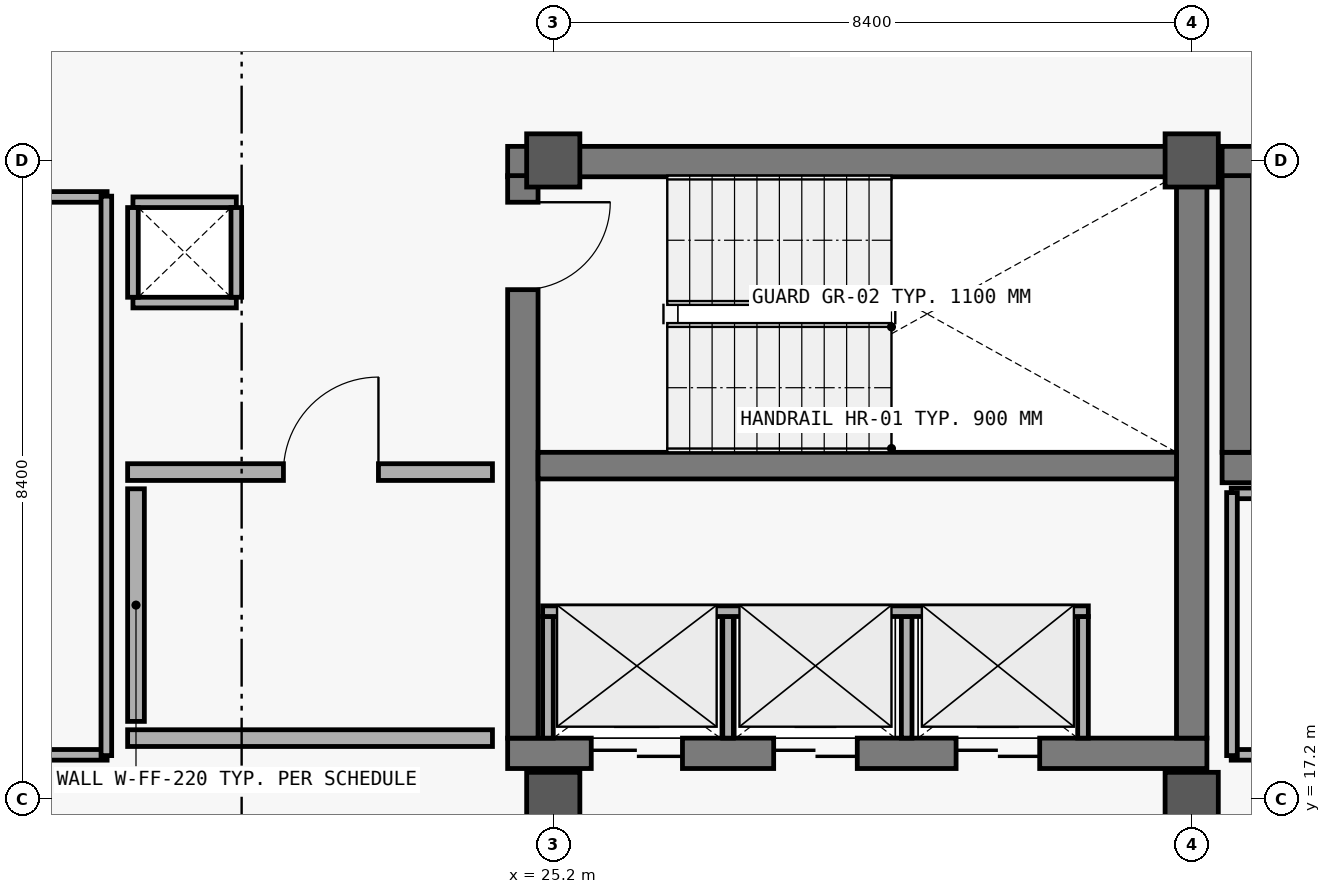
"""IFC4 building model, lengths in metres.
Left out: names, types, materials, properties, quantities, classifications, styles, units other than length and angle.
Written with IfcOpenShell. Run it as: python <this file> out.ifc"""

import sys

from ifc_helpers import new_model, si_unit, direction, frame, frame_2d, origin, origin_2d, place, context, subcontext, project, spatial, rectangle, extrude, element, fill, save


model = new_model("IFC4")
c1 = context("Model", 3, precision=1e-05, world=origin(), true_north=direction((0.0, 1.0)))
c2 = subcontext(c1, "Body", "Model", "MODEL_VIEW")
j1 = project(units=[si_unit("LENGTHUNIT", "METRE"), si_unit("PLANEANGLEUNIT", "RADIAN")], contexts=[c1])
p1 = place(None, origin())
s1 = spatial("IfcSite", under=j1, at=p1, CompositionType="ELEMENT")
p2 = place(p1, origin())
s2 = spatial("IfcBuilding", under=s1, at=p2, CompositionType="ELEMENT")
p3 = place(p2, frame((0.0, 0.0, 26.4)))
s3 = spatial("IfcBuildingStorey", under=s2, at=p3, CompositionType="ELEMENT", Elevation=26.4)
for number, where, z_axis, x_axis in (
    (1, (25.2, 17.2, 0.0), (0.0, 0.0, 1.0), (1.0, 0.0, 0.0)),
    (2, (25.2, 25.6, 0.0), (0.0, 0.0, 1.0), (1.0, 0.0, 0.0)),
    (3, (33.6, 17.2, 0.0), (0.0, 0.0, 1.0), (1.0, 0.0, 0.0)),
    (4, (33.6, 25.6, 0.0), (0.0, 0.0, 1.0), (1.0, 0.0, 0.0)),
):
    element("IfcColumn", number, at=place(p3, frame(where, z_axis=z_axis, x_axis=x_axis)), inside=s3, PredefinedType="COLUMN", context=c2, shape_type="SweptSolid", body=[
        extrude(rectangle(XDim=0.7, YDim=0.7, at=origin_2d()), origin(), (0.0, 0.0, 1.0), 3.6),
    ])
p4 = place(p3, frame((24.6, 17.8, 0.0), z_axis=(0.0, 0.0, 1.0), x_axis=(1.0, 0.0, 0.0)))
e5 = element("IfcWall", 5, at=p4, inside=s3, PredefinedType="SHEAR", context=c2, shape_type="SweptSolid", body=[
    extrude(rectangle(XDim=9.2, YDim=0.4, at=frame_2d((4.6, 0.0))), origin(), (0.0, 0.0, 1.0), 3.32),
])
p5 = place(p4, frame((1.1, 0.0, 0.0)))
e6 = element("IfcOpeningElement", 6, at=p5, cuts=e5, PredefinedType="OPENING", context=c2, shape_type="SweptSolid", body=[
    extrude(rectangle(XDim=1.2, YDim=2.2, at=frame_2d((0.6, 1.1))), frame((0.0, 0.21, 0.0), z_axis=(0.0, -1.0, 0.0), x_axis=(1.0, 0.0, 0.0)), (0.0, 0.0, 1.0), 0.42),
])
p6 = place(p4, frame((3.5, 0.0, 0.0)))
e7 = element("IfcOpeningElement", 7, at=p6, cuts=e5, PredefinedType="OPENING", context=c2, shape_type="SweptSolid", body=[
    extrude(rectangle(XDim=1.1, YDim=2.2, at=frame_2d((0.55, 1.1))), frame((0.0, 0.21, 0.0), z_axis=(0.0, -1.0, 0.0), x_axis=(1.0, 0.0, 0.0)), (0.0, 0.0, 1.0), 0.42),
])
p7 = place(p4, frame((5.9, 0.0, 0.0)))
e8 = element("IfcOpeningElement", 8, at=p7, cuts=e5, PredefinedType="OPENING", context=c2, shape_type="SweptSolid", body=[
    extrude(rectangle(XDim=1.1, YDim=2.2, at=frame_2d((0.55, 1.1))), frame((0.0, 0.21, 0.0), z_axis=(0.0, -1.0, 0.0), x_axis=(1.0, 0.0, 0.0)), (0.0, 0.0, 1.0), 0.42),
])
p8 = place(p3, frame((33.8, 25.585, 0.0), z_axis=(0.0, 0.0, 1.0), x_axis=(-1.0, 0.0, 0.0)))
e9 = element("IfcWall", 9, at=p8, inside=s3, PredefinedType="SHEAR", context=c2, shape_type="SweptSolid", body=[
    extrude(rectangle(XDim=9.2, YDim=0.4, at=frame_2d((4.6, 0.0))), origin(), (0.0, 0.0, 1.0), 3.32),
])
p9 = place(p3, frame((24.8, 25.4, 0.0), z_axis=(0.0, 0.0, 1.0), x_axis=(0.0, -1.0, 0.0)))
e10 = element("IfcWall", 10, at=p9, inside=s3, PredefinedType="SHEAR", context=c2, shape_type="SweptSolid", body=[
    extrude(rectangle(XDim=7.4, YDim=0.4, at=frame_2d((3.7, 0.0))), origin(), (0.0, 0.0, 1.0), 3.32),
])
p10 = place(p9, frame((0.35, 0.0, 0.0)))
e11 = element("IfcOpeningElement", 11, at=p10, cuts=e10, PredefinedType="OPENING", context=c2, shape_type="SweptSolid", body=[
    extrude(rectangle(XDim=1.15, YDim=2.2, at=frame_2d((0.575, 1.1))), frame((0.0, 0.21, 0.0), z_axis=(0.0, -1.0, 0.0), x_axis=(1.0, 0.0, 0.0)), (0.0, 0.0, 1.0), 0.42),
])
p11 = place(p3, frame((33.6, 18.0, 0.0), z_axis=(0.0, 0.0, 1.0), x_axis=(0.0, 1.0, 0.0)))
e12 = element("IfcWall", 12, at=p11, inside=s3, PredefinedType="SHEAR", context=c2, shape_type="SweptSolid", body=[
    extrude(rectangle(XDim=7.4, YDim=0.4, at=frame_2d((3.7, 0.0))), origin(), (0.0, 0.0, 1.0), 3.32),
])
p12 = place(p3, frame((25.0, 21.585, 0.0), z_axis=(0.0, 0.0, 1.0), x_axis=(1.0, 0.0, 0.0)))
e13 = element("IfcWall", 13, at=p12, inside=s3, PredefinedType="SHEAR", context=c2, shape_type="SweptSolid", body=[
    extrude(rectangle(XDim=8.4, YDim=0.35, at=frame_2d((4.2, 0.0))), origin(), (0.0, 0.0, 1.0), 3.32),
])
for number, where, z_axis, x_axis in (
    (14, (25.13, 18.0, 0.0), (0.0, 0.0, 1.0), (0.0, 1.0, 0.0)),
    (15, (27.5, 18.0, 0.0), (0.0, 0.0, 1.0), (0.0, 1.0, 0.0)),
    (16, (29.85, 18.0, 0.0), (0.0, 0.0, 1.0), (0.0, 1.0, 0.0)),
    (17, (32.17, 18.0, 0.0), (0.0, 0.0, 1.0), (0.0, 1.0, 0.0)),
):
    element("IfcWall", number, at=place(p3, frame(where, z_axis=z_axis, x_axis=x_axis)), inside=s3, PredefinedType="PARTITIONING", context=c2, shape_type="SweptSolid", body=[
        extrude(rectangle(XDim=1.6, YDim=0.14, at=frame_2d((0.8, 0.0))), origin(), (0.0, 0.0, 1.0), 2.47),
    ])
p13 = place(p3, frame((25.06, 19.67, 0.0), z_axis=(0.0, 0.0, 1.0), x_axis=(1.0, 0.0, 0.0)))
e18 = element("IfcWall", 18, at=p13, inside=s3, PredefinedType="PARTITIONING", context=c2, shape_type="SweptSolid", body=[
    extrude(rectangle(XDim=7.18, YDim=0.14, at=frame_2d((3.59, 0.0))), origin(), (0.0, 0.0, 1.0), 2.47),
])
p14 = place(p3, frame((19.6, 18.0, 0.0), z_axis=(0.0, 0.0, 1.0), x_axis=(1.0, 0.0, 0.0)))
e19 = element("IfcWall", 19, at=p14, inside=s3, PredefinedType="SOLIDWALL", context=c2, shape_type="SweptSolid", body=[
    extrude(rectangle(XDim=4.8, YDim=0.22, at=frame_2d((2.4, 0.0))), origin(), (0.0, 0.0, 1.0), 2.47),
])
p15 = place(p3, frame((19.6, 21.5, 0.0), z_axis=(0.0, 0.0, 1.0), x_axis=(1.0, 0.0, 0.0)))
e20 = element("IfcWall", 20, at=p15, inside=s3, PredefinedType="SOLIDWALL", context=c2, shape_type="SweptSolid", body=[
    extrude(rectangle(XDim=4.8, YDim=0.22, at=frame_2d((2.4, 0.0))), origin(), (0.0, 0.0, 1.0), 2.47),
])
p16 = place(p15, frame((2.05, 0.0, 0.0)))
e21 = element("IfcOpeningElement", 21, at=p16, cuts=e20, PredefinedType="OPENING", context=c2, shape_type="SweptSolid", body=[
    extrude(rectangle(XDim=1.25, YDim=2.2, at=frame_2d((0.625, 1.1))), frame((0.0, 0.12, 0.0), z_axis=(0.0, -1.0, 0.0), x_axis=(1.0, 0.0, 0.0)), (0.0, 0.0, 1.0), 0.24),
])
p17 = place(p3, frame((19.71, 18.22, 0.0), z_axis=(0.0, 0.0, 1.0), x_axis=(0.0, 1.0, 0.0)))
e22 = element("IfcWall", 22, at=p17, inside=s3, PredefinedType="SOLIDWALL", context=c2, shape_type="SweptSolid", body=[
    extrude(rectangle(XDim=3.06, YDim=0.22, at=frame_2d((1.53, 0.0))), origin(), (0.0, 0.0, 1.0), 2.47),
])
for number, where, z_axis, x_axis in (
    (23, (34.0, 21.56, 0.0), (0.0, 0.0, 1.0), (1.0, 0.0, 0.0)),
    (24, (43.1, 25.585, 0.0), (0.0, 0.0, 1.0), (-1.0, 0.0, 0.0)),
):
    element("IfcWall", number, at=place(p3, frame(where, z_axis=z_axis, x_axis=x_axis)), inside=s3, PredefinedType="SHEAR", context=c2, shape_type="SweptSolid", body=[
        extrude(rectangle(XDim=9.1, YDim=0.4, at=frame_2d((4.55, 0.0))), origin(), (0.0, 0.0, 1.0), 3.32),
    ])
p18 = place(p3, frame((34.2, 25.4, 0.0), z_axis=(0.0, 0.0, 1.0), x_axis=(0.0, -1.0, 0.0)))
e25 = element("IfcWall", 25, at=p18, inside=s3, PredefinedType="SHEAR", context=c2, shape_type="SweptSolid", body=[
    extrude(rectangle(XDim=3.64, YDim=0.4, at=frame_2d((1.82, 0.0))), origin(), (0.0, 0.0, 1.0), 3.32),
])
p19 = place(p3, frame((8.68, 17.78, 0.0), z_axis=(0.0, 0.0, 1.0), x_axis=(1.0, 0.0, 0.0)))
e26 = element("IfcWall", 26, at=p19, inside=s3, PredefinedType="PARTITIONING", context=c2, shape_type="SweptSolid", body=[
    extrude(rectangle(XDim=10.65, YDim=0.14, at=frame_2d((5.325, 0.0))), origin(), (0.0, 0.0, 1.0), 2.48),
])
p20 = place(p19, frame((3.97, 0.0, 0.0)))
e27 = element("IfcOpeningElement", 27, at=p20, cuts=e26, PredefinedType="OPENING", context=c2, shape_type="SweptSolid", body=[
    extrude(rectangle(XDim=1.08, YDim=2.25, at=frame_2d((0.54, 1.125))), frame((0.0, 0.08, 0.0), z_axis=(0.0, -1.0, 0.0), x_axis=(1.0, 0.0, 0.0)), (0.0, 0.0, 1.0), 0.16),
])
for number, where, z_axis, x_axis in (
    (28, (34.12, 17.78, 0.0), (0.0, 0.0, 1.0), (1.0, 0.0, 0.0)),
    (29, (34.12, 21.22, 0.0), (0.0, 0.0, 1.0), (1.0, 0.0, 0.0)),
):
    element("IfcWall", number, at=place(p3, frame(where, z_axis=z_axis, x_axis=x_axis)), inside=s3, PredefinedType="PARTITIONING", context=c2, shape_type="SweptSolid", body=[
        extrude(rectangle(XDim=10.76, YDim=0.14, at=frame_2d((5.38, 0.0))), origin(), (0.0, 0.0, 1.0), 2.48),
    ])
p21 = place(p3, frame((34.13, 17.77, 0.0), z_axis=(0.0, 0.0, 1.0), x_axis=(0.0, 1.0, 0.0)))
e30 = element("IfcWall", 30, at=p21, inside=s3, PredefinedType="PARTITIONING", context=c2, shape_type="SweptSolid", body=[
    extrude(rectangle(XDim=3.46, YDim=0.14, at=frame_2d((1.73, 0.0))), origin(), (0.0, 0.0, 1.0), 2.48),
])
p22 = place(p3, frame((8.68, 25.12, 0.0), z_axis=(0.0, 0.0, 1.0), x_axis=(1.0, 0.0, 0.0)))
e31 = element("IfcWall", 31, at=p22, inside=s3, PredefinedType="PARTITIONING", context=c2, shape_type="SweptSolid", body=[
    extrude(rectangle(XDim=10.65, YDim=0.14, at=frame_2d((5.325, 0.0))), origin(), (0.0, 0.0, 1.0), 2.48),
])
p23 = place(p3, frame((19.32, 17.77, 0.0), z_axis=(0.0, 0.0, 1.0), x_axis=(0.0, 1.0, 0.0)))
e32 = element("IfcWall", 32, at=p23, inside=s3, PredefinedType="PARTITIONING", context=c2, shape_type="SweptSolid", body=[
    extrude(rectangle(XDim=7.36, YDim=0.14, at=frame_2d((3.68, 0.0))), origin(), (0.0, 0.0, 1.0), 2.48),
])
for number, where, z_axis, x_axis in (
    (33, (19.67, 23.73, 0.0), (0.0, 0.0, 1.0), (1.0, 0.0, 0.0)),
    (34, (21.03, 25.05, 0.0), (0.0, 0.0, 1.0), (-1.0, 0.0, 0.0)),
):
    element("IfcWall", number, at=place(p3, frame(where, z_axis=z_axis, x_axis=x_axis)), inside=s3, PredefinedType="PARTITIONING", context=c2, shape_type="SweptSolid", body=[
        extrude(rectangle(XDim=1.36, YDim=0.14, at=frame_2d((0.68, 0.0))), origin(), (0.0, 0.0, 1.0), 2.44),
    ])
for number, where, z_axis, x_axis in (
    (35, (19.67, 24.98, 0.0), (0.0, 0.0, 1.0), (0.0, -1.0, 0.0)),
    (36, (21.03, 23.8, 0.0), (0.0, 0.0, 1.0), (0.0, 1.0, 0.0)),
):
    element("IfcWall", number, at=place(p3, frame(where, z_axis=z_axis, x_axis=x_axis)), inside=s3, PredefinedType="PARTITIONING", context=c2, shape_type="SweptSolid", body=[
        extrude(rectangle(XDim=1.18, YDim=0.14, at=frame_2d((0.59, 0.0))), origin(), (0.0, 0.0, 1.0), 2.44),
    ])
p24 = place(p10, origin())
e37 = element("IfcDoor", 37, at=p24, inside=s3, OperationType="SINGLE_SWING_LEFT", PredefinedType="DOOR", context=c2, shape_type="SweptSolid", body=[
    extrude(rectangle(XDim=1.15, YDim=2.2, at=frame_2d((0.575, 1.1))), frame((0.0, 0.025, 0.0), z_axis=(0.0, -1.0, 0.0), x_axis=(1.0, 0.0, 0.0)), (0.0, 0.0, 1.0), 0.05),
])
fill(e11, e37)
p25 = place(p5, origin())
e38 = element("IfcDoor", 38, at=p25, inside=s3, OperationType="DOUBLE_DOOR_SLIDING", PredefinedType="DOOR", context=c2, shape_type="SweptSolid", body=[
    extrude(rectangle(XDim=1.2, YDim=2.2, at=frame_2d((0.6, 1.1))), frame((0.0, 0.025, 0.0), z_axis=(0.0, -1.0, 0.0), x_axis=(1.0, 0.0, 0.0)), (0.0, 0.0, 1.0), 0.05),
])
fill(e6, e38)
p26 = place(p6, origin())
e39 = element("IfcDoor", 39, at=p26, inside=s3, OperationType="DOUBLE_DOOR_SLIDING", PredefinedType="DOOR", context=c2, shape_type="SweptSolid", body=[
    extrude(rectangle(XDim=1.1, YDim=2.2, at=frame_2d((0.55, 1.1))), frame((0.0, 0.025, 0.0), z_axis=(0.0, -1.0, 0.0), x_axis=(1.0, 0.0, 0.0)), (0.0, 0.0, 1.0), 0.05),
])
fill(e7, e39)
p27 = place(p7, origin())
e40 = element("IfcDoor", 40, at=p27, inside=s3, OperationType="DOUBLE_DOOR_SLIDING", PredefinedType="DOOR", context=c2, shape_type="SweptSolid", body=[
    extrude(rectangle(XDim=1.1, YDim=2.2, at=frame_2d((0.55, 1.1))), frame((0.0, 0.025, 0.0), z_axis=(0.0, -1.0, 0.0), x_axis=(1.0, 0.0, 0.0)), (0.0, 0.0, 1.0), 0.05),
])
fill(e8, e40)
p28 = place(p16, origin())
e41 = element("IfcDoor", 41, at=p28, inside=s3, OperationType="SINGLE_SWING_RIGHT", PredefinedType="DOOR", context=c2, shape_type="SweptSolid", body=[
    extrude(rectangle(XDim=1.25, YDim=2.2, at=frame_2d((0.625, 1.1))), frame((0.0, 0.025, 0.0), z_axis=(0.0, -1.0, 0.0), x_axis=(1.0, 0.0, 0.0)), (0.0, 0.0, 1.0), 0.05),
])
fill(e21, e41)
save(model, sys.argv[1])
